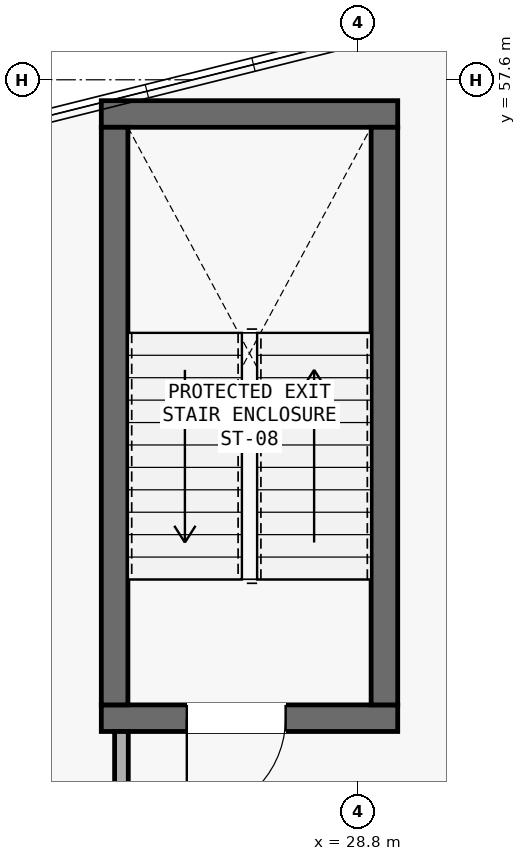
"""IFC4 building model, lengths in metres.
Left out: names, types, materials, properties, quantities, classifications, styles, units other than length and angle.
Written with IfcOpenShell. Run it as: python <this file> out.ifc"""

import sys

from ifc_helpers import new_model, si_unit, direction, frame, frame_2d, origin, place, context, subcontext, project, spatial, rectangle, extrude, element, fill, save


model = new_model("IFC4")
c1 = context("Model", 3, precision=1e-05, world=origin(), true_north=direction((0.0, 1.0)))
c2 = subcontext(c1, "Body", "Model", "MODEL_VIEW")
j1 = project(units=[si_unit("LENGTHUNIT", "METRE"), si_unit("PLANEANGLEUNIT", "RADIAN")], contexts=[c1])
p1 = place(None, origin())
s1 = spatial("IfcSite", under=j1, at=p1, CompositionType="ELEMENT")
p2 = place(p1, origin())
s2 = spatial("IfcBuilding", under=s1, at=p2, CompositionType="ELEMENT")
p3 = place(p2, frame((0.0, 0.0, 9.45)))
s3 = spatial("IfcBuildingStorey", under=s2, at=p3, CompositionType="ELEMENT", Elevation=9.45)
p4 = place(p3, frame((25.425, 49.2, 0.0), z_axis=(0.0, 0.0, 1.0), x_axis=(1.0, 0.0, 0.0)))
e1 = element("IfcWall", 1, at=p4, inside=s3, PredefinedType="SHEAR", context=c2, shape_type="SweptSolid", body=[
    extrude(rectangle(XDim=3.9, YDim=0.35, at=frame_2d((1.95, 0.0))), origin(), (0.0, 0.0, 1.0), 3.97),
])
p5 = place(p4, frame((1.125, 0.0, 0.0)))
e2 = element("IfcOpeningElement", 2, at=p5, cuts=e1, PredefinedType="OPENING", context=c2, shape_type="SweptSolid", body=[
    extrude(rectangle(XDim=1.3, YDim=2.15, at=frame_2d((0.65, 1.075))), frame((0.0, 0.185, 0.0), z_axis=(0.0, -1.0, 0.0), x_axis=(1.0, 0.0, 0.0)), (0.0, 0.0, 1.0), 0.37),
])
p6 = place(p3, frame((25.425, 57.15, 0.0), z_axis=(0.0, 0.0, 1.0), x_axis=(1.0, 0.0, 0.0)))
e3 = element("IfcWall", 3, at=p6, inside=s3, PredefinedType="SHEAR", context=c2, shape_type="SweptSolid", body=[
    extrude(rectangle(XDim=3.9, YDim=0.35, at=frame_2d((1.95, 0.0))), origin(), (0.0, 0.0, 1.0), 3.97),
])
for number, where, z_axis, x_axis in (
    (4, (25.6, 49.375, 0.0), (0.0, 0.0, 1.0), (0.0, 1.0, 0.0)),
    (5, (29.15, 49.375, 0.0), (0.0, 0.0, 1.0), (0.0, 1.0, 0.0)),
):
    element("IfcWall", number, at=place(p3, frame(where, z_axis=z_axis, x_axis=x_axis)), inside=s3, PredefinedType="SHEAR", context=c2, shape_type="SweptSolid", body=[
        extrude(rectangle(XDim=7.6, YDim=0.35, at=frame_2d((3.8, 0.0))), origin(), (0.0, 0.0, 1.0), 3.97),
    ])
p7 = place(p3, frame((25.69, 45.65, 0.0), z_axis=(0.0, 0.0, 1.0), x_axis=(0.0, 1.0, 0.0)))
e6 = element("IfcWall", 6, at=p7, inside=s3, PredefinedType="PARTITIONING", context=c2, shape_type="SweptSolid", body=[
    extrude(rectangle(XDim=3.375, YDim=0.18, at=frame_2d((1.688, 0.0))), origin(), (0.0, 0.0, 1.0), 3.97),
])
p8 = place(p5, frame((1.3, 0.0, 0.0), z_axis=(0.0, 0.0, 1.0), x_axis=(-1.0, 0.0, 0.0)))
e7 = element("IfcDoor", 7, at=p8, inside=s3, OperationType="SINGLE_SWING_LEFT", PredefinedType="DOOR", context=c2, shape_type="SweptSolid", body=[
    extrude(rectangle(XDim=1.3, YDim=2.15, at=frame_2d((0.65, 1.075))), frame((0.0, 0.025, 0.0), z_axis=(0.0, -1.0, 0.0), x_axis=(1.0, 0.0, 0.0)), (0.0, 0.0, 1.0), 0.05),
])
fill(e2, e7)
save(model, sys.argv[1])
